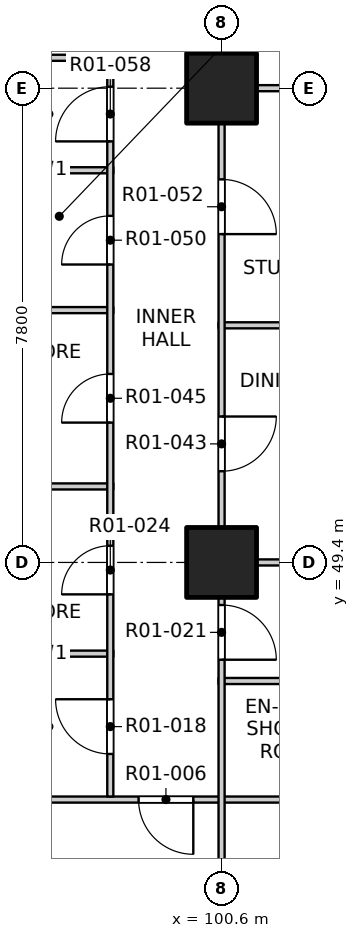
"""IFC4 building model, lengths in metres.
Left out: names, types, materials, properties, quantities, classifications, styles, units other than length and angle.
Written with IfcOpenShell. Run it as: python <this file> out.ifc"""

import sys

from ifc_helpers import new_model, si_unit, direction, frame, frame_2d, origin, origin_2d, place, context, subcontext, project, spatial, rectangle, extrude, element, fill, save


model = new_model("IFC4")
c1 = context("Model", 3, precision=1e-05, world=origin(), true_north=direction((0.0, 1.0)))
c2 = subcontext(c1, "Body", "Model", "MODEL_VIEW")
j1 = project(units=[si_unit("LENGTHUNIT", "METRE"), si_unit("PLANEANGLEUNIT", "RADIAN")], contexts=[c1])
p1 = place(None, origin())
s1 = spatial("IfcSite", under=j1, at=p1, CompositionType="ELEMENT")
p2 = place(p1, origin())
s2 = spatial("IfcBuilding", under=s1, at=p2, CompositionType="ELEMENT")
p3 = place(p2, frame((0.0, 0.0, 19.5)))
s3 = spatial("IfcBuildingStorey", under=s2, at=p3, CompositionType="ELEMENT", Elevation=19.5)
for number, where, z_axis, x_axis in (
    (1, (100.6, 49.4, -0.25), (0.0, 0.0, 1.0), (1.0, 0.0, 0.0)),
    (2, (100.6, 57.2, -0.25), (0.0, 0.0, 1.0), (1.0, 0.0, 0.0)),
):
    element("IfcColumn", number, at=place(p3, frame(where, z_axis=z_axis, x_axis=x_axis)), inside=s3, PredefinedType="COLUMN", context=c2, shape_type="SweptSolid", body=[
        extrude(rectangle(XDim=1.15, YDim=1.15, at=origin_2d()), origin(), (0.0, 0.0, 1.0), 3.4),
    ])
p4 = place(p3, frame((96.6, 45.5, 0.0), z_axis=(0.0, 0.0, 1.0), x_axis=(1.0, 0.0, 0.0)))
e3 = element("IfcWall", 3, at=p4, inside=s3, PredefinedType="PARTITIONING", context=c2, shape_type="SweptSolid", body=[
    extrude(rectangle(XDim=11.5, YDim=0.1, at=frame_2d((5.75, 0.0))), origin(), (0.0, 0.0, 1.0), 3.15),
])
p5 = place(p4, frame((2.635, 0.0, 0.0)))
e4 = element("IfcOpeningElement", 4, at=p5, cuts=e3, PredefinedType="OPENING", context=c2, shape_type="SweptSolid", body=[
    extrude(rectangle(XDim=0.9, YDim=2.1, at=frame_2d((0.45, 1.05))), frame((0.0, 0.06, 0.0), z_axis=(0.0, -1.0, 0.0), x_axis=(1.0, 0.0, 0.0)), (0.0, 0.0, 1.0), 0.12),
])
p6 = place(p3, frame((100.55, 47.45, 0.0), z_axis=(0.0, 0.0, 1.0), x_axis=(1.0, 0.0, 0.0)))
e5 = element("IfcWall", 5, at=p6, inside=s3, PredefinedType="PARTITIONING", context=c2, shape_type="SweptSolid", body=[
    extrude(rectangle(XDim=3.55, YDim=0.1, at=frame_2d((1.775, 0.0))), origin(), (0.0, 0.0, 1.0), 3.15),
])
p7 = place(p3, frame((96.6, 47.9, 0.0), z_axis=(0.0, 0.0, 1.0), x_axis=(1.0, 0.0, 0.0)))
e6 = element("IfcWall", 6, at=p7, inside=s3, PredefinedType="PARTITIONING", context=c2, shape_type="SweptSolid", body=[
    extrude(rectangle(XDim=2.22, YDim=0.1, at=frame_2d((1.11, 0.0))), origin(), (0.0, 0.0, 1.0), 3.15),
])
p8 = place(p3, frame((100.55, 49.4, 0.0), z_axis=(0.0, 0.0, 1.0), x_axis=(1.0, 0.0, 0.0)))
e7 = element("IfcWall", 7, at=p8, inside=s3, PredefinedType="PARTITIONING", context=c2, shape_type="SweptSolid", body=[
    extrude(rectangle(XDim=7.55, YDim=0.1, at=frame_2d((3.775, 0.0))), origin(), (0.0, 0.0, 1.0), 2.55),
])
p9 = place(p3, frame((96.6, 50.65, 0.0), z_axis=(0.0, 0.0, 1.0), x_axis=(1.0, 0.0, 0.0)))
e8 = element("IfcWall", 8, at=p9, inside=s3, PredefinedType="PARTITIONING", context=c2, shape_type="SweptSolid", body=[
    extrude(rectangle(XDim=2.22, YDim=0.1, at=frame_2d((1.11, 0.0))), origin(), (0.0, 0.0, 1.0), 3.15),
])
p10 = place(p3, frame((100.55, 53.3, 0.0), z_axis=(0.0, 0.0, 1.0), x_axis=(1.0, 0.0, 0.0)))
e9 = element("IfcWall", 9, at=p10, inside=s3, PredefinedType="PARTITIONING", context=c2, shape_type="SweptSolid", body=[
    extrude(rectangle(XDim=7.55, YDim=0.1, at=frame_2d((3.775, 0.0))), origin(), (0.0, 0.0, 1.0), 3.15),
])
for number, where, z_axis, x_axis in (
    (10, (96.6, 53.55, 0.0), (0.0, 0.0, 1.0), (1.0, 0.0, 0.0)),
    (11, (96.6, 55.85, 0.0), (0.0, 0.0, 1.0), (1.0, 0.0, 0.0)),
):
    element("IfcWall", number, at=place(p3, frame(where, z_axis=z_axis, x_axis=x_axis)), inside=s3, PredefinedType="PARTITIONING", context=c2, shape_type="SweptSolid", body=[
        extrude(rectangle(XDim=2.22, YDim=0.1, at=frame_2d((1.11, 0.0))), origin(), (0.0, 0.0, 1.0), 3.15),
    ])
p11 = place(p3, frame((100.55, 57.2, 0.0), z_axis=(0.0, 0.0, 1.0), x_axis=(1.0, 0.0, 0.0)))
e12 = element("IfcWall", 12, at=p11, inside=s3, PredefinedType="PARTITIONING", context=c2, shape_type="SweptSolid", body=[
    extrude(rectangle(XDim=7.55, YDim=0.1, at=frame_2d((3.775, 0.0))), origin(), (0.0, 0.0, 1.0), 2.55),
])
p12 = place(p3, frame((96.6, 57.7, 0.0), z_axis=(0.0, 0.0, 1.0), x_axis=(1.0, 0.0, 0.0)))
e13 = element("IfcWall", 13, at=p12, inside=s3, PredefinedType="PARTITIONING", context=c2, shape_type="SweptSolid", body=[
    extrude(rectangle(XDim=2.22, YDim=0.1, at=frame_2d((1.11, 0.0))), origin(), (0.0, 0.0, 1.0), 3.15),
])
p13 = place(p3, frame((98.77, 45.55, 0.0), z_axis=(0.0, 0.0, 1.0), x_axis=(0.0, 1.0, 0.0)))
e14 = element("IfcWall", 14, at=p13, inside=s3, PredefinedType="PARTITIONING", context=c2, shape_type="SweptSolid", body=[
    extrude(rectangle(XDim=12.1, YDim=0.1, at=frame_2d((6.05, 0.0))), origin(), (0.0, 0.0, 1.0), 3.15),
])
p14 = place(p13, frame((0.7, 0.0, 0.0)))
e15 = element("IfcOpeningElement", 15, at=p14, cuts=e14, PredefinedType="OPENING", context=c2, shape_type="SweptSolid", body=[
    extrude(rectangle(XDim=0.9, YDim=2.1, at=frame_2d((0.45, 1.05))), frame((0.0, 0.06, 0.0), z_axis=(0.0, -1.0, 0.0), x_axis=(1.0, 0.0, 0.0)), (0.0, 0.0, 1.0), 0.12),
])
p15 = place(p13, frame((3.325, 0.0, 0.0)))
e16 = element("IfcOpeningElement", 16, at=p15, cuts=e14, PredefinedType="OPENING", context=c2, shape_type="SweptSolid", body=[
    extrude(rectangle(XDim=0.8, YDim=2.1, at=frame_2d((0.4, 1.05))), frame((0.0, 0.06, 0.0), z_axis=(0.0, -1.0, 0.0), x_axis=(1.0, 0.0, 0.0)), (0.0, 0.0, 1.0), 0.12),
])
p16 = place(p13, frame((6.15, 0.0, 0.0)))
e17 = element("IfcOpeningElement", 17, at=p16, cuts=e14, PredefinedType="OPENING", context=c2, shape_type="SweptSolid", body=[
    extrude(rectangle(XDim=0.8, YDim=2.1, at=frame_2d((0.4, 1.05))), frame((0.0, 0.06, 0.0), z_axis=(0.0, -1.0, 0.0), x_axis=(1.0, 0.0, 0.0)), (0.0, 0.0, 1.0), 0.12),
])
p17 = place(p13, frame((8.75, 0.0, 0.0)))
e18 = element("IfcOpeningElement", 18, at=p17, cuts=e14, PredefinedType="OPENING", context=c2, shape_type="SweptSolid", body=[
    extrude(rectangle(XDim=0.8, YDim=2.1, at=frame_2d((0.4, 1.05))), frame((0.0, 0.06, 0.0), z_axis=(0.0, -1.0, 0.0), x_axis=(1.0, 0.0, 0.0)), (0.0, 0.0, 1.0), 0.12),
])
p18 = place(p13, frame((10.775, 0.0, 0.0)))
e19 = element("IfcOpeningElement", 19, at=p18, cuts=e14, PredefinedType="OPENING", context=c2, shape_type="SweptSolid", body=[
    extrude(rectangle(XDim=0.9, YDim=2.1, at=frame_2d((0.45, 1.05))), frame((0.0, 0.06, 0.0), z_axis=(0.0, -1.0, 0.0), x_axis=(1.0, 0.0, 0.0)), (0.0, 0.0, 1.0), 0.12),
])
p19 = place(p3, frame((100.6, 41.9, 0.0), z_axis=(0.0, 0.0, 1.0), x_axis=(0.0, 1.0, 0.0)))
e20 = element("IfcWall", 20, at=p19, inside=s3, PredefinedType="PARTITIONING", context=c2, shape_type="SweptSolid", body=[
    extrude(rectangle(XDim=7.5, YDim=0.1, at=frame_2d((3.75, 0.0))), origin(), (0.0, 0.0, 1.0), 2.55),
])
p20 = place(p19, frame((1.2, 0.0, 0.0)))
e21 = element("IfcOpeningElement", 21, at=p20, cuts=e20, PredefinedType="OPENING", context=c2, shape_type="SweptSolid", body=[
    extrude(rectangle(XDim=0.9, YDim=2.1, at=frame_2d((0.45, 1.05))), frame((0.0, 0.06, 0.0), z_axis=(0.0, -1.0, 0.0), x_axis=(1.0, 0.0, 0.0)), (0.0, 0.0, 1.0), 0.12),
])
p21 = place(p19, frame((5.9, 0.0, 0.0)))
e22 = element("IfcOpeningElement", 22, at=p21, cuts=e20, PredefinedType="OPENING", context=c2, shape_type="SweptSolid", body=[
    extrude(rectangle(XDim=0.9, YDim=2.1, at=frame_2d((0.45, 1.05))), frame((0.0, 0.06, 0.0), z_axis=(0.0, -1.0, 0.0), x_axis=(1.0, 0.0, 0.0)), (0.0, 0.0, 1.0), 0.12),
])
p22 = place(p3, frame((100.6, 49.4, 0.0), z_axis=(0.0, 0.0, 1.0), x_axis=(0.0, 1.0, 0.0)))
e23 = element("IfcWall", 23, at=p22, inside=s3, PredefinedType="PARTITIONING", context=c2, shape_type="SweptSolid", body=[
    extrude(rectangle(XDim=31.2, YDim=0.1, at=frame_2d((15.6, 0.0))), origin(), (0.0, 0.0, 1.0), 3.15),
])
p23 = place(p22, frame((1.5, 0.0, 0.0)))
e24 = element("IfcOpeningElement", 24, at=p23, cuts=e23, PredefinedType="OPENING", context=c2, shape_type="SweptSolid", body=[
    extrude(rectangle(XDim=0.9, YDim=2.1, at=frame_2d((0.45, 1.05))), frame((0.0, 0.06, 0.0), z_axis=(0.0, -1.0, 0.0), x_axis=(1.0, 0.0, 0.0)), (0.0, 0.0, 1.0), 0.12),
])
p24 = place(p22, frame((5.4, 0.0, 0.0)))
e25 = element("IfcOpeningElement", 25, at=p24, cuts=e23, PredefinedType="OPENING", context=c2, shape_type="SweptSolid", body=[
    extrude(rectangle(XDim=0.9, YDim=2.1, at=frame_2d((0.45, 1.05))), frame((0.0, 0.06, 0.0), z_axis=(0.0, -1.0, 0.0), x_axis=(1.0, 0.0, 0.0)), (0.0, 0.0, 1.0), 0.12),
])
p25 = place(p22, frame((10.275, 0.0, 0.0)))
e26 = element("IfcOpeningElement", 26, at=p25, cuts=e23, PredefinedType="OPENING", context=c2, shape_type="SweptSolid", body=[
    extrude(rectangle(XDim=0.9, YDim=2.1, at=frame_2d((0.45, 1.05))), frame((0.0, 0.06, 0.0), z_axis=(0.0, -1.0, 0.0), x_axis=(1.0, 0.0, 0.0)), (0.0, 0.0, 1.0), 0.12),
])
p26 = place(p22, frame((14.0, 0.0, 0.0)))
e27 = element("IfcOpeningElement", 27, at=p26, cuts=e23, PredefinedType="OPENING", context=c2, shape_type="SweptSolid", body=[
    extrude(rectangle(XDim=0.9, YDim=2.1, at=frame_2d((0.45, 1.05))), frame((0.0, 0.06, 0.0), z_axis=(0.0, -1.0, 0.0), x_axis=(1.0, 0.0, 0.0)), (0.0, 0.0, 1.0), 0.12),
])
p27 = place(p22, frame((17.1, 0.0, 0.0)))
e28 = element("IfcOpeningElement", 28, at=p27, cuts=e23, PredefinedType="OPENING", context=c2, shape_type="SweptSolid", body=[
    extrude(rectangle(XDim=0.9, YDim=2.1, at=frame_2d((0.45, 1.05))), frame((0.0, 0.06, 0.0), z_axis=(0.0, -1.0, 0.0), x_axis=(1.0, 0.0, 0.0)), (0.0, 0.0, 1.0), 0.12),
])
p28 = place(p22, frame((21.8, 0.0, 0.0)))
e29 = element("IfcOpeningElement", 29, at=p28, cuts=e23, PredefinedType="OPENING", context=c2, shape_type="SweptSolid", body=[
    extrude(rectangle(XDim=0.9, YDim=2.1, at=frame_2d((0.45, 1.05))), frame((0.0, 0.06, 0.0), z_axis=(0.0, -1.0, 0.0), x_axis=(1.0, 0.0, 0.0)), (0.0, 0.0, 1.0), 0.12),
])
p29 = place(p22, frame((24.9, 0.0, 0.0)))
e30 = element("IfcOpeningElement", 30, at=p29, cuts=e23, PredefinedType="OPENING", context=c2, shape_type="SweptSolid", body=[
    extrude(rectangle(XDim=0.9, YDim=2.1, at=frame_2d((0.45, 1.05))), frame((0.0, 0.06, 0.0), z_axis=(0.0, -1.0, 0.0), x_axis=(1.0, 0.0, 0.0)), (0.0, 0.0, 1.0), 0.12),
])
p30 = place(p22, frame((28.8, 0.0, 0.0)))
e31 = element("IfcOpeningElement", 31, at=p30, cuts=e23, PredefinedType="OPENING", context=c2, shape_type="SweptSolid", body=[
    extrude(rectangle(XDim=0.9, YDim=2.1, at=frame_2d((0.45, 1.05))), frame((0.0, 0.06, 0.0), z_axis=(0.0, -1.0, 0.0), x_axis=(1.0, 0.0, 0.0)), (0.0, 0.0, 1.0), 0.12),
])
p31 = place(p5, origin())
e32 = element("IfcDoor", 32, at=p31, inside=s3, OperationType="SINGLE_SWING_LEFT", PredefinedType="DOOR", context=c2, shape_type="SweptSolid", body=[
    extrude(rectangle(XDim=0.9, YDim=2.1, at=frame_2d((0.45, 1.05))), frame((0.0, 0.025, 0.0), z_axis=(0.0, -1.0, 0.0), x_axis=(1.0, 0.0, 0.0)), (0.0, 0.0, 1.0), 0.05),
])
fill(e4, e32)
p32 = place(p14, origin())
e33 = element("IfcDoor", 33, at=p32, inside=s3, OperationType="SINGLE_SWING_RIGHT", PredefinedType="DOOR", context=c2, shape_type="SweptSolid", body=[
    extrude(rectangle(XDim=0.9, YDim=2.1, at=frame_2d((0.45, 1.05))), frame((0.0, 0.025, 0.0), z_axis=(0.0, -1.0, 0.0), x_axis=(1.0, 0.0, 0.0)), (0.0, 0.0, 1.0), 0.05),
])
fill(e15, e33)
p33 = place(p21, origin())
e34 = element("IfcDoor", 34, at=p33, inside=s3, OperationType="SINGLE_SWING_RIGHT", PredefinedType="DOOR", context=c2, shape_type="SweptSolid", body=[
    extrude(rectangle(XDim=0.9, YDim=2.1, at=frame_2d((0.45, 1.05))), frame((0.0, 0.025, 0.0), z_axis=(0.0, -1.0, 0.0), x_axis=(1.0, 0.0, 0.0)), (0.0, 0.0, 1.0), 0.05),
])
fill(e22, e34)
p34 = place(p15, origin())
e35 = element("IfcDoor", 35, at=p34, inside=s3, OperationType="SINGLE_SWING_LEFT", PredefinedType="DOOR", context=c2, shape_type="SweptSolid", body=[
    extrude(rectangle(XDim=0.8, YDim=2.1, at=frame_2d((0.4, 1.05))), frame((0.0, 0.025, 0.0), z_axis=(0.0, -1.0, 0.0), x_axis=(1.0, 0.0, 0.0)), (0.0, 0.0, 1.0), 0.05),
])
fill(e16, e35)
p35 = place(p23, origin())
e36 = element("IfcDoor", 36, at=p35, inside=s3, OperationType="SINGLE_SWING_LEFT", PredefinedType="DOOR", context=c2, shape_type="SweptSolid", body=[
    extrude(rectangle(XDim=0.9, YDim=2.1, at=frame_2d((0.45, 1.05))), frame((0.0, 0.025, 0.0), z_axis=(0.0, -1.0, 0.0), x_axis=(1.0, 0.0, 0.0)), (0.0, 0.0, 1.0), 0.05),
])
fill(e24, e36)
p36 = place(p16, origin())
e37 = element("IfcDoor", 37, at=p36, inside=s3, OperationType="SINGLE_SWING_LEFT", PredefinedType="DOOR", context=c2, shape_type="SweptSolid", body=[
    extrude(rectangle(XDim=0.8, YDim=2.1, at=frame_2d((0.4, 1.05))), frame((0.0, 0.025, 0.0), z_axis=(0.0, -1.0, 0.0), x_axis=(1.0, 0.0, 0.0)), (0.0, 0.0, 1.0), 0.05),
])
fill(e17, e37)
p37 = place(p17, origin())
e38 = element("IfcDoor", 38, at=p37, inside=s3, OperationType="SINGLE_SWING_LEFT", PredefinedType="DOOR", context=c2, shape_type="SweptSolid", body=[
    extrude(rectangle(XDim=0.8, YDim=2.1, at=frame_2d((0.4, 1.05))), frame((0.0, 0.025, 0.0), z_axis=(0.0, -1.0, 0.0), x_axis=(1.0, 0.0, 0.0)), (0.0, 0.0, 1.0), 0.05),
])
fill(e18, e38)
p38 = place(p24, origin())
e39 = element("IfcDoor", 39, at=p38, inside=s3, OperationType="SINGLE_SWING_RIGHT", PredefinedType="DOOR", context=c2, shape_type="SweptSolid", body=[
    extrude(rectangle(XDim=0.9, YDim=2.1, at=frame_2d((0.45, 1.05))), frame((0.0, 0.025, 0.0), z_axis=(0.0, -1.0, 0.0), x_axis=(1.0, 0.0, 0.0)), (0.0, 0.0, 1.0), 0.05),
])
fill(e25, e39)
p39 = place(p18, origin())
e40 = element("IfcDoor", 40, at=p39, inside=s3, OperationType="SINGLE_SWING_LEFT", PredefinedType="DOOR", context=c2, shape_type="SweptSolid", body=[
    extrude(rectangle(XDim=0.9, YDim=2.1, at=frame_2d((0.45, 1.05))), frame((0.0, 0.025, 0.0), z_axis=(0.0, -1.0, 0.0), x_axis=(1.0, 0.0, 0.0)), (0.0, 0.0, 1.0), 0.05),
])
fill(e19, e40)
save(model, sys.argv[1])
